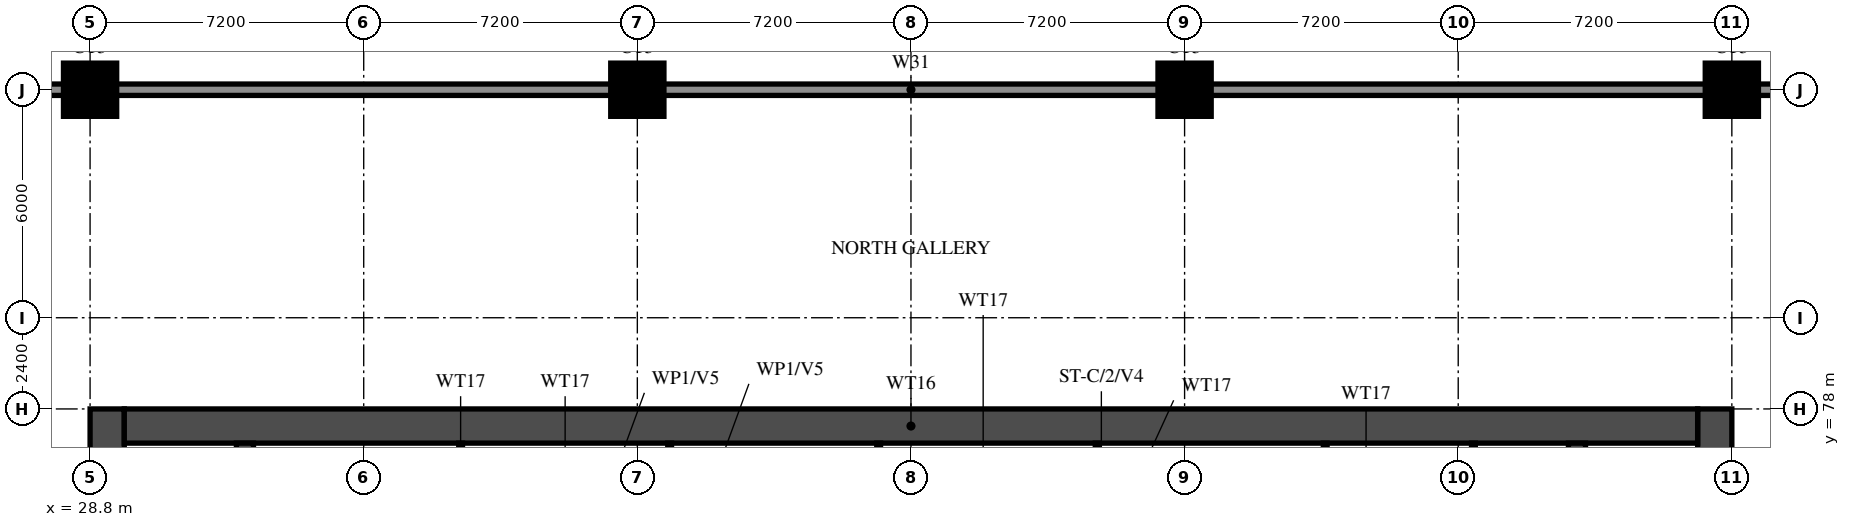
"""IFC4 building model, lengths in metres.
Left out: names, types, materials, properties, quantities, classifications, styles, units other than length and angle.
Written with IfcOpenShell. Run it as: python <this file> out.ifc"""

import sys

from ifc_helpers import new_model, si_unit, direction, frame, frame_2d, origin, origin_2d, place, context, subcontext, project, spatial, rectangle, circle, extrude, source, transform, mapped, element, save


model = new_model("IFC4")
c1 = context("Model", 3, precision=1e-05, world=origin(), true_north=direction((0.0, 1.0)))
c2 = subcontext(c1, "Body", "Model", "MODEL_VIEW")
j1 = project(units=[si_unit("LENGTHUNIT", "METRE"), si_unit("PLANEANGLEUNIT", "RADIAN")], contexts=[c1])
p1 = place(None, origin())
s1 = spatial("IfcSite", under=j1, at=p1, CompositionType="ELEMENT")
p2 = place(p1, origin())
s2 = spatial("IfcBuilding", under=s1, at=p2, CompositionType="ELEMENT")
p3 = place(p2, frame((0.0, 0.0, 17.4)))
s3 = spatial("IfcBuildingStorey", under=s2, at=p3, CompositionType="ELEMENT", Elevation=17.4)
m1 = source(origin(), c2, "Body", "SweptSolid", [
    extrude(circle(Radius=0.7, at=origin_2d()), origin(), (0.0, 0.0, 1.0), 3.8),
])
for number, where, z_axis, x_axis in (
    (1, (28.8, 86.4, 0.0), (0.0, 0.0, 1.0), (1.0, 0.0, 0.0)),
    (2, (43.2, 86.4, 0.0), (0.0, 0.0, 1.0), (1.0, 0.0, 0.0)),
    (3, (57.6, 86.4, 0.0), (0.0, 0.0, 1.0), (1.0, 0.0, 0.0)),
    (4, (72.0, 86.4, 0.0), (0.0, 0.0, 1.0), (1.0, 0.0, 0.0)),
):
    element("IfcColumn", number, at=place(p3, frame(where, z_axis=z_axis, x_axis=x_axis)), inside=s3, PredefinedType="COLUMN", context=c2, shape_type="MappedRepresentation", body=[
        mapped(m1, transform((0.0, 0.0, 0.0))),
    ])
for number, where, z_axis, x_axis in (
    (5, (29.25, 66.0, 0.0), (0.0, 0.0, 1.0), (0.0, 1.0, 0.0)),
    (6, (71.55, 66.0, 0.0), (0.0, 0.0, 1.0), (0.0, 1.0, 0.0)),
):
    element("IfcWall", number, at=place(p3, frame(where, z_axis=z_axis, x_axis=x_axis)), inside=s3, PredefinedType="SHEAR", context=c2, shape_type="SweptSolid", body=[
        extrude(rectangle(XDim=12.0, YDim=0.9, at=frame_2d((6.0, 0.0))), origin(), (0.0, 0.0, 1.0), 3.8),
    ])
p4 = place(p3, frame((29.7, 77.55, 0.0), z_axis=(0.0, 0.0, 1.0), x_axis=(1.0, 0.0, 0.0)))
e7 = element("IfcWall", 7, at=p4, inside=s3, PredefinedType="SHEAR", context=c2, shape_type="SweptSolid", body=[
    extrude(rectangle(XDim=41.4, YDim=0.9, at=frame_2d((20.7, 0.0))), origin(), (0.0, 0.0, 1.0), 3.8),
])
p5 = place(p3, frame((32.875, 66.45, 0.0), z_axis=(0.0, 0.0, 1.0), x_axis=(0.0, 1.0, 0.0)))
e8 = element("IfcWall", 8, at=p5, inside=s3, PredefinedType="SHEAR", context=c2, shape_type="SweptSolid", body=[
    extrude(rectangle(XDim=10.65, YDim=0.45, at=frame_2d((5.325, 0.0))), origin(), (0.0, 0.0, 1.0), 3.8),
])
p6 = place(p3, frame((67.925, 66.45, 0.0), z_axis=(0.0, 0.0, 1.0), x_axis=(0.0, 1.0, 0.0)))
e9 = element("IfcWall", 9, at=p6, inside=s3, PredefinedType="SHEAR", context=c2, shape_type="SweptSolid", body=[
    extrude(rectangle(XDim=10.65, YDim=0.45, at=frame_2d((5.325, 0.0))), origin(), (0.0, 0.0, 1.0), 3.8),
])
p7 = place(p6, frame((0.15, 0.0, 0.0)))
e10 = element("IfcOpeningElement", 10, at=p7, cuts=e9, PredefinedType="OPENING", context=c2, shape_type="SweptSolid", body=[
    extrude(rectangle(XDim=1.1, YDim=2.1, at=frame_2d((0.55, 1.05))), frame((0.0, 0.235, 0.0), z_axis=(0.0, -1.0, 0.0), x_axis=(1.0, 0.0, 0.0)), (0.0, 0.0, 1.0), 0.47),
])
for number, where, z_axis, x_axis in (
    (11, (38.55, 76.325, 0.0), (0.0, 0.0, 1.0), (0.0, 1.0, 0.0)),
    (12, (44.05, 76.325, 0.0), (0.0, 0.0, 1.0), (0.0, 1.0, 0.0)),
    (13, (49.55, 76.325, 0.0), (0.0, 0.0, 1.0), (0.0, 1.0, 0.0)),
    (14, (55.3, 76.325, 0.0), (0.0, 0.0, 1.0), (0.0, 1.0, 0.0)),
    (15, (61.3, 76.325, 0.0), (0.0, 0.0, 1.0), (0.0, 1.0, 0.0)),
    (16, (65.2, 76.325, 0.0), (0.0, 0.0, 1.0), (0.0, 1.0, 0.0)),
):
    element("IfcWall", number, at=place(p3, frame(where, z_axis=z_axis, x_axis=x_axis)), inside=s3, PredefinedType="PARTITIONING", context=c2, shape_type="SweptSolid", body=[
        extrude(rectangle(XDim=0.775, YDim=0.1, at=frame_2d((0.388, 0.0))), origin(), (0.0, 0.0, 1.0), 3.8),
    ])
p8 = place(p3, frame((0.0, 86.4, 0.0), z_axis=(0.0, 0.0, 1.0), x_axis=(1.0, 0.0, 0.0)))
e17 = element("IfcWall", 17, at=p8, inside=s3, PredefinedType="SOLIDWALL", context=c2, shape_type="SweptSolid", body=[
    extrude(rectangle(XDim=100.8, YDim=0.3, at=frame_2d((50.4, 0.0))), origin(), (0.0, 0.0, 1.0), 3.8),
])
p9 = place(p8, frame((2.4, 0.0, 0.6)))
e18 = element("IfcOpeningElement", 18, at=p9, cuts=e17, PredefinedType="OPENING", context=c2, shape_type="SweptSolid", body=[
    extrude(rectangle(XDim=1.8, YDim=2.4, at=frame_2d((0.9, 1.2))), frame((0.0, 0.16, 0.0), z_axis=(0.0, -1.0, 0.0), x_axis=(1.0, 0.0, 0.0)), (0.0, 0.0, 1.0), 0.32),
])
p10 = place(p8, frame((6.0, 0.0, 0.6)))
e19 = element("IfcOpeningElement", 19, at=p10, cuts=e17, PredefinedType="OPENING", context=c2, shape_type="SweptSolid", body=[
    extrude(rectangle(XDim=1.8, YDim=2.4, at=frame_2d((0.9, 1.2))), frame((0.0, 0.16, 0.0), z_axis=(0.0, -1.0, 0.0), x_axis=(1.0, 0.0, 0.0)), (0.0, 0.0, 1.0), 0.32),
])
p11 = place(p8, frame((9.6, 0.0, 0.6)))
e20 = element("IfcOpeningElement", 20, at=p11, cuts=e17, PredefinedType="OPENING", context=c2, shape_type="SweptSolid", body=[
    extrude(rectangle(XDim=1.8, YDim=2.4, at=frame_2d((0.9, 1.2))), frame((0.0, 0.16, 0.0), z_axis=(0.0, -1.0, 0.0), x_axis=(1.0, 0.0, 0.0)), (0.0, 0.0, 1.0), 0.32),
])
p12 = place(p8, frame((16.8, 0.0, 0.6)))
e21 = element("IfcOpeningElement", 21, at=p12, cuts=e17, PredefinedType="OPENING", context=c2, shape_type="SweptSolid", body=[
    extrude(rectangle(XDim=1.8, YDim=2.4, at=frame_2d((0.9, 1.2))), frame((0.0, 0.16, 0.0), z_axis=(0.0, -1.0, 0.0), x_axis=(1.0, 0.0, 0.0)), (0.0, 0.0, 1.0), 0.32),
])
p13 = place(p8, frame((20.4, 0.0, 0.6)))
e22 = element("IfcOpeningElement", 22, at=p13, cuts=e17, PredefinedType="OPENING", context=c2, shape_type="SweptSolid", body=[
    extrude(rectangle(XDim=1.8, YDim=2.4, at=frame_2d((0.9, 1.2))), frame((0.0, 0.16, 0.0), z_axis=(0.0, -1.0, 0.0), x_axis=(1.0, 0.0, 0.0)), (0.0, 0.0, 1.0), 0.32),
])
p14 = place(p8, frame((78.0, 0.0, 0.6)))
e23 = element("IfcOpeningElement", 23, at=p14, cuts=e17, PredefinedType="OPENING", context=c2, shape_type="SweptSolid", body=[
    extrude(rectangle(XDim=1.8, YDim=2.4, at=frame_2d((0.9, 1.2))), frame((0.0, 0.16, 0.0), z_axis=(0.0, -1.0, 0.0), x_axis=(1.0, 0.0, 0.0)), (0.0, 0.0, 1.0), 0.32),
])
p15 = place(p8, frame((81.6, 0.0, 0.6)))
e24 = element("IfcOpeningElement", 24, at=p15, cuts=e17, PredefinedType="OPENING", context=c2, shape_type="SweptSolid", body=[
    extrude(rectangle(XDim=1.8, YDim=2.4, at=frame_2d((0.9, 1.2))), frame((0.0, 0.16, 0.0), z_axis=(0.0, -1.0, 0.0), x_axis=(1.0, 0.0, 0.0)), (0.0, 0.0, 1.0), 0.32),
])
p16 = place(p8, frame((88.8, 0.0, 0.6)))
e25 = element("IfcOpeningElement", 25, at=p16, cuts=e17, PredefinedType="OPENING", context=c2, shape_type="SweptSolid", body=[
    extrude(rectangle(XDim=1.8, YDim=2.4, at=frame_2d((0.9, 1.2))), frame((0.0, 0.16, 0.0), z_axis=(0.0, -1.0, 0.0), x_axis=(1.0, 0.0, 0.0)), (0.0, 0.0, 1.0), 0.32),
])
p17 = place(p8, frame((92.4, 0.0, 0.6)))
e26 = element("IfcOpeningElement", 26, at=p17, cuts=e17, PredefinedType="OPENING", context=c2, shape_type="SweptSolid", body=[
    extrude(rectangle(XDim=1.8, YDim=2.4, at=frame_2d((0.9, 1.2))), frame((0.0, 0.16, 0.0), z_axis=(0.0, -1.0, 0.0), x_axis=(1.0, 0.0, 0.0)), (0.0, 0.0, 1.0), 0.32),
])
p18 = place(p8, frame((96.0, 0.0, 0.6)))
e27 = element("IfcOpeningElement", 27, at=p18, cuts=e17, PredefinedType="OPENING", context=c2, shape_type="SweptSolid", body=[
    extrude(rectangle(XDim=1.8, YDim=2.4, at=frame_2d((0.9, 1.2))), frame((0.0, 0.16, 0.0), z_axis=(0.0, -1.0, 0.0), x_axis=(1.0, 0.0, 0.0)), (0.0, 0.0, 1.0), 0.32),
])
save(model, sys.argv[1])
